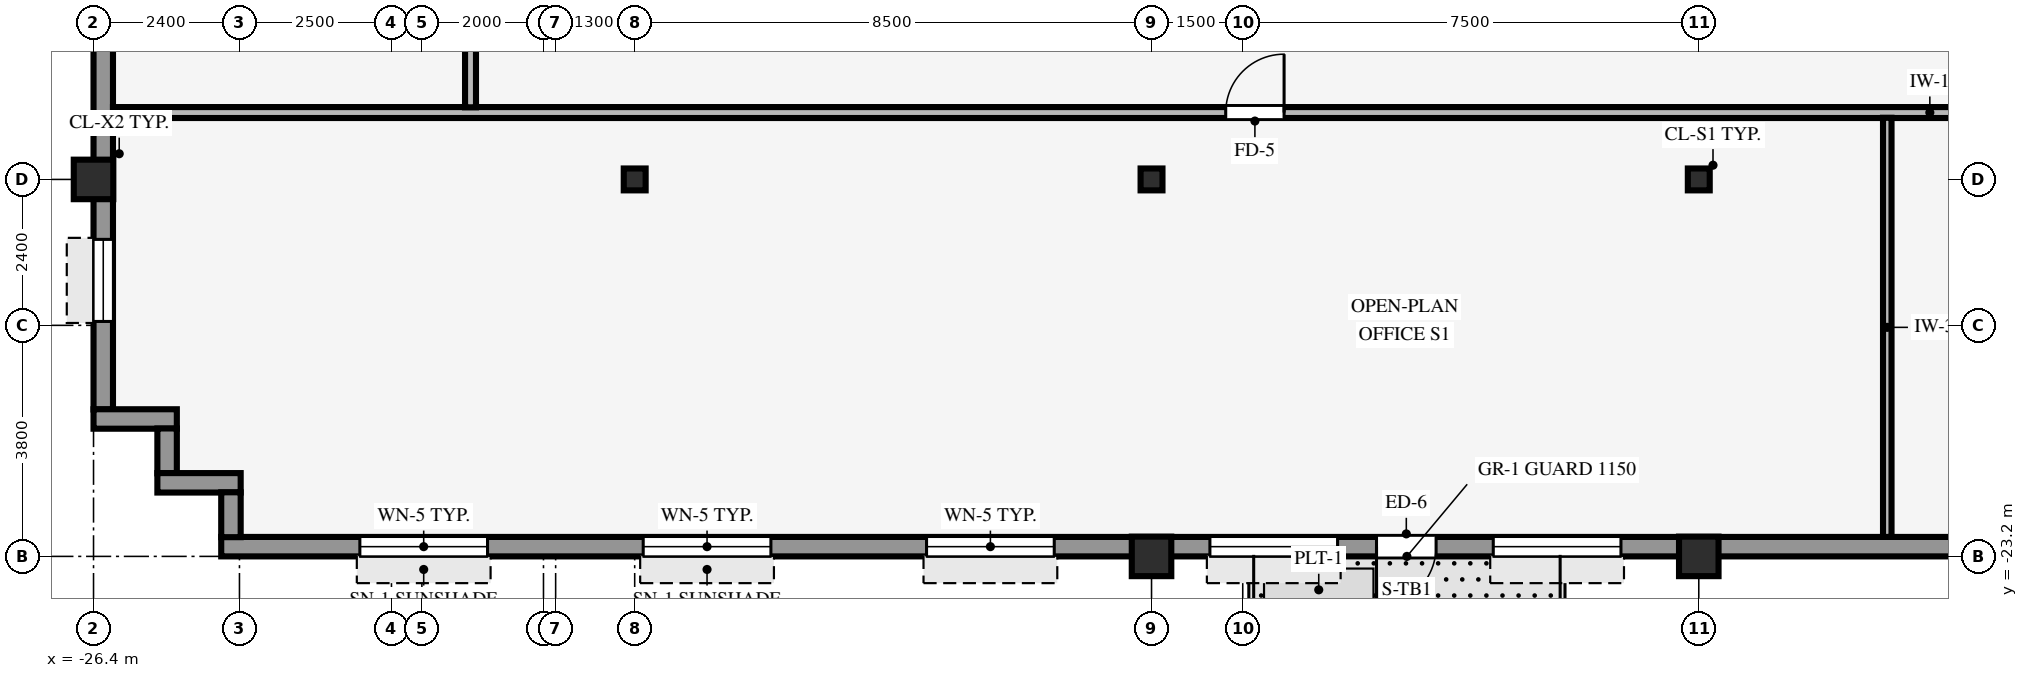
"""IFC4 building model, lengths in metres.
Left out: names, types, materials, properties, quantities, classifications, styles, units other than length and angle.
Written with IfcOpenShell. Run it as: python <this file> out.ifc"""

import sys

from ifc_helpers import new_model, si_unit, direction, frame, frame_2d, origin, origin_2d, place, context, subcontext, project, spatial, rectangle, hollow_rectangle, i_section, extrude, source, transform, mapped, element, fill, save


model = new_model("IFC4")
c1 = context("Model", 3, precision=1e-05, world=origin(), true_north=direction((0.0, 1.0)))
c2 = subcontext(c1, "Body", "Model", "MODEL_VIEW")
j1 = project(units=[si_unit("LENGTHUNIT", "METRE"), si_unit("PLANEANGLEUNIT", "RADIAN")], contexts=[c1])
p1 = place(None, origin())
s1 = spatial("IfcSite", under=j1, at=p1, CompositionType="ELEMENT")
p2 = place(p1, origin())
s2 = spatial("IfcBuilding", under=s1, at=p2, CompositionType="ELEMENT")
p3 = place(p2, frame((0.0, 0.0, 138.45)))
s3 = spatial("IfcBuildingStorey", under=s2, at=p3, CompositionType="ELEMENT", Elevation=138.45)
for number, where, z_axis, x_axis in (
    (1, (-26.4, -17.0, 0.0), (0.0, 0.0, 1.0), (1.0, 0.0, 0.0)),
    (2, (-9.0, -23.2, 0.0), (0.0, 0.0, 1.0), (1.0, 0.0, 0.0)),
    (3, (0.0, -23.2, 0.0), (0.0, 0.0, 1.0), (1.0, 0.0, 0.0)),
):
    element("IfcColumn", number, at=place(p3, frame(where, z_axis=z_axis, x_axis=x_axis)), inside=s3, PredefinedType="COLUMN", context=c2, shape_type="SweptSolid", body=[
        extrude(hollow_rectangle(XDim=0.65, YDim=0.65, WallThickness=0.04, InnerFilletRadius=0.04, OuterFilletRadius=0.08, at=origin_2d()), origin(), (0.0, 0.0, 1.0), 3.37),
    ])
for number, where, z_axis, x_axis in (
    (4, (0.0, -17.0, 0.0), (0.0, 0.0, 1.0), (1.0, 0.0, 0.0)),
    (5, (-17.5, -17.0, 0.0), (0.0, 0.0, 1.0), (1.0, 0.0, 0.0)),
    (6, (-9.0, -17.0, 0.0), (0.0, 0.0, 1.0), (1.0, 0.0, 0.0)),
):
    element("IfcColumn", number, at=place(p3, frame(where, z_axis=z_axis, x_axis=x_axis)), inside=s3, PredefinedType="COLUMN", context=c2, shape_type="SweptSolid", body=[
        extrude(i_section(OverallWidth=0.36, OverallDepth=0.36, WebThickness=0.021, FlangeThickness=0.021, FilletRadius=0.018, at=origin_2d()), origin(), (0.0, 0.0, 1.0), 3.37),
    ])
p4 = place(p3, frame((-24.3, -23.04, 0.0), z_axis=(0.0, 0.0, 1.0), x_axis=(1.0, 0.0, 0.0)))
e7 = element("IfcWall", 7, at=p4, inside=s3, PredefinedType="STANDARD", context=c2, shape_type="SweptSolid", body=[
    extrude(rectangle(XDim=48.6, YDim=0.32, at=frame_2d((24.3, 0.0))), origin(), (0.0, 0.0, 1.0), 2.705),
])
p5 = place(p4, frame((19.98, 0.0, 0.0), z_axis=(0.0, 0.0, 1.0), x_axis=(-1.0, 0.0, 0.0)))
e8 = element("IfcOpeningElement", 8, at=p5, cuts=e7, PredefinedType="OPENING", context=c2, shape_type="SweptSolid", body=[
    extrude(rectangle(XDim=0.98, YDim=2.15, at=frame_2d((0.49, 1.075))), frame((0.0, 0.17, 0.0), z_axis=(0.0, -1.0, 0.0), x_axis=(1.0, 0.0, 0.0)), (0.0, 0.0, 1.0), 0.34),
])
p6 = place(p4, frame((2.28, 0.0, 0.8)))
e9 = element("IfcOpeningElement", 9, at=p6, cuts=e7, PredefinedType="OPENING", context=c2, shape_type="SweptSolid", body=[
    extrude(rectangle(XDim=2.1, YDim=1.56, at=frame_2d((1.05, 0.78))), frame((0.0, 0.17, 0.0), z_axis=(0.0, -1.0, 0.0), x_axis=(1.0, 0.0, 0.0)), (0.0, 0.0, 1.0), 0.34),
])
p7 = place(p4, frame((6.94, 0.0, 0.8)))
e10 = element("IfcOpeningElement", 10, at=p7, cuts=e7, PredefinedType="OPENING", context=c2, shape_type="SweptSolid", body=[
    extrude(rectangle(XDim=2.1, YDim=1.56, at=frame_2d((1.05, 0.78))), frame((0.0, 0.17, 0.0), z_axis=(0.0, -1.0, 0.0), x_axis=(1.0, 0.0, 0.0)), (0.0, 0.0, 1.0), 0.34),
])
p8 = place(p4, frame((11.6, 0.0, 0.8)))
e11 = element("IfcOpeningElement", 11, at=p8, cuts=e7, PredefinedType="OPENING", context=c2, shape_type="SweptSolid", body=[
    extrude(rectangle(XDim=2.1, YDim=1.56, at=frame_2d((1.05, 0.78))), frame((0.0, 0.17, 0.0), z_axis=(0.0, -1.0, 0.0), x_axis=(1.0, 0.0, 0.0)), (0.0, 0.0, 1.0), 0.34),
])
p9 = place(p4, frame((16.26, 0.0, 0.8)))
e12 = element("IfcOpeningElement", 12, at=p9, cuts=e7, PredefinedType="OPENING", context=c2, shape_type="SweptSolid", body=[
    extrude(rectangle(XDim=2.1, YDim=1.56, at=frame_2d((1.05, 0.78))), frame((0.0, 0.17, 0.0), z_axis=(0.0, -1.0, 0.0), x_axis=(1.0, 0.0, 0.0)), (0.0, 0.0, 1.0), 0.34),
])
p10 = place(p4, frame((20.92, 0.0, 0.8)))
e13 = element("IfcOpeningElement", 13, at=p10, cuts=e7, PredefinedType="OPENING", context=c2, shape_type="SweptSolid", body=[
    extrude(rectangle(XDim=2.1, YDim=1.56, at=frame_2d((1.05, 0.78))), frame((0.0, 0.17, 0.0), z_axis=(0.0, -1.0, 0.0), x_axis=(1.0, 0.0, 0.0)), (0.0, 0.0, 1.0), 0.34),
])
p11 = place(p4, frame((30.24, 0.0, 0.8)))
e14 = element("IfcOpeningElement", 14, at=p11, cuts=e7, PredefinedType="OPENING", context=c2, shape_type="SweptSolid", body=[
    extrude(rectangle(XDim=2.1, YDim=1.56, at=frame_2d((1.05, 0.78))), frame((0.0, 0.17, 0.0), z_axis=(0.0, -1.0, 0.0), x_axis=(1.0, 0.0, 0.0)), (0.0, 0.0, 1.0), 0.34),
])
p12 = place(p4, frame((34.9, 0.0, 0.8)))
e15 = element("IfcOpeningElement", 15, at=p12, cuts=e7, PredefinedType="OPENING", context=c2, shape_type="SweptSolid", body=[
    extrude(rectangle(XDim=2.1, YDim=1.56, at=frame_2d((1.05, 0.78))), frame((0.0, 0.17, 0.0), z_axis=(0.0, -1.0, 0.0), x_axis=(1.0, 0.0, 0.0)), (0.0, 0.0, 1.0), 0.34),
])
p13 = place(p4, frame((39.56, 0.0, 0.8)))
e16 = element("IfcOpeningElement", 16, at=p13, cuts=e7, PredefinedType="OPENING", context=c2, shape_type="SweptSolid", body=[
    extrude(rectangle(XDim=2.1, YDim=1.56, at=frame_2d((1.05, 0.78))), frame((0.0, 0.17, 0.0), z_axis=(0.0, -1.0, 0.0), x_axis=(1.0, 0.0, 0.0)), (0.0, 0.0, 1.0), 0.34),
])
p14 = place(p4, frame((44.22, 0.0, 0.8)))
e17 = element("IfcOpeningElement", 17, at=p14, cuts=e7, PredefinedType="OPENING", context=c2, shape_type="SweptSolid", body=[
    extrude(rectangle(XDim=2.1, YDim=1.56, at=frame_2d((1.05, 0.78))), frame((0.0, 0.17, 0.0), z_axis=(0.0, -1.0, 0.0), x_axis=(1.0, 0.0, 0.0)), (0.0, 0.0, 1.0), 0.34),
])
p15 = place(p3, frame((-26.24, -20.784, 0.0), z_axis=(0.0, 0.0, 1.0), x_axis=(0.0, 1.0, 0.0)))
e18 = element("IfcWall", 18, at=p15, inside=s3, PredefinedType="STANDARD", context=c2, shape_type="SweptSolid", body=[
    extrude(rectangle(XDim=41.568, YDim=0.32, at=frame_2d((20.784, 0.0))), origin(), (0.0, 0.0, 1.0), 2.705),
])
p16 = place(p15, frame((1.448, 0.0, 0.8)))
e19 = element("IfcOpeningElement", 19, at=p16, cuts=e18, PredefinedType="OPENING", context=c2, shape_type="SweptSolid", body=[
    extrude(rectangle(XDim=1.35, YDim=1.56, at=frame_2d((0.675, 0.78))), frame((0.0, 0.17, 0.0), z_axis=(0.0, -1.0, 0.0), x_axis=(1.0, 0.0, 0.0)), (0.0, 0.0, 1.0), 0.34),
])
p17 = place(p15, frame((7.744, 0.0, 0.8)))
e20 = element("IfcOpeningElement", 20, at=p17, cuts=e18, PredefinedType="OPENING", context=c2, shape_type="SweptSolid", body=[
    extrude(rectangle(XDim=1.35, YDim=1.56, at=frame_2d((0.675, 0.78))), frame((0.0, 0.17, 0.0), z_axis=(0.0, -1.0, 0.0), x_axis=(1.0, 0.0, 0.0)), (0.0, 0.0, 1.0), 0.34),
])
p18 = place(p15, frame((12.69, 0.0, 0.8)))
e21 = element("IfcOpeningElement", 21, at=p18, cuts=e18, PredefinedType="OPENING", context=c2, shape_type="SweptSolid", body=[
    extrude(rectangle(XDim=1.35, YDim=1.56, at=frame_2d((0.675, 0.78))), frame((0.0, 0.17, 0.0), z_axis=(0.0, -1.0, 0.0), x_axis=(1.0, 0.0, 0.0)), (0.0, 0.0, 1.0), 0.34),
])
p19 = place(p15, frame((17.636, 0.0, 0.8)))
e22 = element("IfcOpeningElement", 22, at=p19, cuts=e18, PredefinedType="OPENING", context=c2, shape_type="SweptSolid", body=[
    extrude(rectangle(XDim=1.35, YDim=1.56, at=frame_2d((0.675, 0.78))), frame((0.0, 0.17, 0.0), z_axis=(0.0, -1.0, 0.0), x_axis=(1.0, 0.0, 0.0)), (0.0, 0.0, 1.0), 0.34),
])
p20 = place(p15, frame((22.582, 0.0, 0.8)))
e23 = element("IfcOpeningElement", 23, at=p20, cuts=e18, PredefinedType="OPENING", context=c2, shape_type="SweptSolid", body=[
    extrude(rectangle(XDim=1.35, YDim=1.56, at=frame_2d((0.675, 0.78))), frame((0.0, 0.17, 0.0), z_axis=(0.0, -1.0, 0.0), x_axis=(1.0, 0.0, 0.0)), (0.0, 0.0, 1.0), 0.34),
])
p21 = place(p15, frame((27.528, 0.0, 0.8)))
e24 = element("IfcOpeningElement", 24, at=p21, cuts=e18, PredefinedType="OPENING", context=c2, shape_type="SweptSolid", body=[
    extrude(rectangle(XDim=1.35, YDim=1.56, at=frame_2d((0.675, 0.78))), frame((0.0, 0.17, 0.0), z_axis=(0.0, -1.0, 0.0), x_axis=(1.0, 0.0, 0.0)), (0.0, 0.0, 1.0), 0.34),
])
p22 = place(p15, frame((32.474, 0.0, 0.8)))
e25 = element("IfcOpeningElement", 25, at=p22, cuts=e18, PredefinedType="OPENING", context=c2, shape_type="SweptSolid", body=[
    extrude(rectangle(XDim=1.35, YDim=1.56, at=frame_2d((0.675, 0.78))), frame((0.0, 0.17, 0.0), z_axis=(0.0, -1.0, 0.0), x_axis=(1.0, 0.0, 0.0)), (0.0, 0.0, 1.0), 0.34),
])
p23 = place(p15, frame((38.77, 0.0, 0.8)))
e26 = element("IfcOpeningElement", 26, at=p23, cuts=e18, PredefinedType="OPENING", context=c2, shape_type="SweptSolid", body=[
    extrude(rectangle(XDim=1.35, YDim=1.56, at=frame_2d((0.675, 0.78))), frame((0.0, 0.17, 0.0), z_axis=(0.0, -1.0, 0.0), x_axis=(1.0, 0.0, 0.0)), (0.0, 0.0, 1.0), 0.34),
])
p24 = place(p3, frame((-26.4, -20.94, 0.0), z_axis=(0.0, 0.0, 1.0), x_axis=(1.0, 0.0, 0.0)))
e27 = element("IfcWall", 27, at=p24, inside=s3, PredefinedType="STANDARD", context=c2, shape_type="SweptSolid", body=[
    extrude(rectangle(XDim=1.37, YDim=0.32, at=frame_2d((0.685, 0.0))), origin(), (0.0, 0.0, 1.0), 3.36),
])
p25 = place(p3, frame((-25.19, -21.834, 0.0), z_axis=(0.0, 0.0, 1.0), x_axis=(0.0, 1.0, 0.0)))
e28 = element("IfcWall", 28, at=p25, inside=s3, PredefinedType="STANDARD", context=c2, shape_type="SweptSolid", body=[
    extrude(rectangle(XDim=0.738, YDim=0.32, at=frame_2d((0.369, 0.0))), origin(), (0.0, 0.0, 1.0), 3.36),
])
p26 = place(p3, frame((-25.35, -21.99, 0.0), z_axis=(0.0, 0.0, 1.0), x_axis=(1.0, 0.0, 0.0)))
e29 = element("IfcWall", 29, at=p26, inside=s3, PredefinedType="STANDARD", context=c2, shape_type="SweptSolid", body=[
    extrude(rectangle(XDim=1.37, YDim=0.32, at=frame_2d((0.685, 0.0))), origin(), (0.0, 0.0, 1.0), 3.36),
])
p27 = place(p3, frame((-24.14, -22.884, 0.0), z_axis=(0.0, 0.0, 1.0), x_axis=(0.0, 1.0, 0.0)))
e30 = element("IfcWall", 30, at=p27, inside=s3, PredefinedType="STANDARD", context=c2, shape_type="SweptSolid", body=[
    extrude(rectangle(XDim=0.738, YDim=0.32, at=frame_2d((0.369, 0.0))), origin(), (0.0, 0.0, 1.0), 3.36),
])
p28 = place(p3, frame((-26.08, -15.9, 0.0), z_axis=(0.0, 0.0, 1.0), x_axis=(1.0, 0.0, 0.0)))
e31 = element("IfcWall", 31, at=p28, inside=s3, PredefinedType="PARTITIONING", context=c2, shape_type="SweptSolid", body=[
    extrude(rectangle(XDim=52.16, YDim=0.18, at=frame_2d((26.08, 0.0))), origin(), (0.0, 0.0, 1.0), 3.36),
])
p29 = place(p28, frame((18.3, 0.0, 0.0)))
e32 = element("IfcOpeningElement", 32, at=p29, cuts=e31, PredefinedType="OPENING", context=c2, shape_type="SweptSolid", body=[
    extrude(rectangle(XDim=0.96, YDim=2.1, at=frame_2d((0.48, 1.05))), frame((0.0, 0.1, 0.0), z_axis=(0.0, -1.0, 0.0), x_axis=(1.0, 0.0, 0.0)), (0.0, 0.0, 1.0), 0.2),
])
p30 = place(p28, frame((40.5, 0.0, 0.0)))
e33 = element("IfcOpeningElement", 33, at=p30, cuts=e31, PredefinedType="OPENING", context=c2, shape_type="SweptSolid", body=[
    extrude(rectangle(XDim=0.96, YDim=2.1, at=frame_2d((0.48, 1.05))), frame((0.0, 0.1, 0.0), z_axis=(0.0, -1.0, 0.0), x_axis=(1.0, 0.0, 0.0)), (0.0, 0.0, 1.0), 0.2),
])
p31 = place(p3, frame((-20.2, -15.814, 0.0), z_axis=(0.0, 0.0, 1.0), x_axis=(0.0, 1.0, 0.0)))
e34 = element("IfcWall", 34, at=p31, inside=s3, PredefinedType="PARTITIONING", context=c2, shape_type="SweptSolid", body=[
    extrude(rectangle(XDim=31.628, YDim=0.18, at=frame_2d((15.814, 0.0))), origin(), (0.0, 0.0, 1.0), 3.36),
])
p32 = place(p31, frame((10.684, 0.0, 0.0)))
e35 = element("IfcOpeningElement", 35, at=p32, cuts=e34, PredefinedType="OPENING", context=c2, shape_type="SweptSolid", body=[
    extrude(rectangle(XDim=0.96, YDim=2.1, at=frame_2d((0.48, 1.05))), frame((0.0, 0.1, 0.0), z_axis=(0.0, -1.0, 0.0), x_axis=(1.0, 0.0, 0.0)), (0.0, 0.0, 1.0), 0.2),
])
p33 = place(p31, frame((24.184, 0.0, 0.0)))
e36 = element("IfcOpeningElement", 36, at=p33, cuts=e34, PredefinedType="OPENING", context=c2, shape_type="SweptSolid", body=[
    extrude(rectangle(XDim=0.96, YDim=2.1, at=frame_2d((0.48, 1.05))), frame((0.0, 0.1, 0.0), z_axis=(0.0, -1.0, 0.0), x_axis=(1.0, 0.0, 0.0)), (0.0, 0.0, 1.0), 0.2),
])
p34 = place(p3, frame((3.1, -22.88, 0.0), z_axis=(0.0, 0.0, 1.0), x_axis=(0.0, 1.0, 0.0)))
e37 = element("IfcWall", 37, at=p34, inside=s3, PredefinedType="PARTITIONING", context=c2, shape_type="SweptSolid", body=[
    extrude(rectangle(XDim=6.894, YDim=0.14, at=frame_2d((3.447, 0.0))), origin(), (0.0, 0.0, 1.0), 3.36),
])
m1 = source(origin(), c2, "Body", "SweptSolid", [
    extrude(rectangle(XDim=0.98, YDim=2.15, at=frame_2d((0.49, 1.075))), frame((0.0, 0.025, 0.0), z_axis=(0.0, -1.0, 0.0), x_axis=(1.0, 0.0, 0.0)), (0.0, 0.0, 1.0), 0.05),
])
p35 = place(p5, origin())
e38 = element("IfcDoor", 38, at=p35, inside=s3, OperationType="SINGLE_SWING_RIGHT", PredefinedType="DOOR", context=c2, shape_type="MappedRepresentation", body=[
    mapped(m1, transform((0.0, 0.0, 0.0), scale=1.0)),
])
fill(e8, e38)
m2 = source(origin(), c2, "Body", "SweptSolid", [
    extrude(rectangle(XDim=2.1, YDim=1.56, at=frame_2d((1.05, 0.78))), frame((0.0, 0.03, 0.0), z_axis=(0.0, -1.0, 0.0), x_axis=(1.0, 0.0, 0.0)), (0.0, 0.0, 1.0), 0.06),
])
p36 = place(p6, origin())
e39 = element("IfcWindow", 39, at=p36, inside=s3, PartitioningType="SINGLE_PANEL", PredefinedType="WINDOW", context=c2, shape_type="MappedRepresentation", body=[
    mapped(m2, transform((0.0, 0.0, 0.0), scale=1.0)),
])
fill(e9, e39)
p37 = place(p7, origin())
e40 = element("IfcWindow", 40, at=p37, inside=s3, PartitioningType="SINGLE_PANEL", PredefinedType="WINDOW", context=c2, shape_type="MappedRepresentation", body=[
    mapped(m2, transform((0.0, 0.0, 0.0), scale=1.0)),
])
fill(e10, e40)
p38 = place(p8, origin())
e41 = element("IfcWindow", 41, at=p38, inside=s3, PartitioningType="SINGLE_PANEL", PredefinedType="WINDOW", context=c2, shape_type="MappedRepresentation", body=[
    mapped(m2, transform((0.0, 0.0, 0.0), scale=1.0)),
])
fill(e11, e41)
p39 = place(p9, origin())
e42 = element("IfcWindow", 42, at=p39, inside=s3, PartitioningType="SINGLE_PANEL", PredefinedType="WINDOW", context=c2, shape_type="MappedRepresentation", body=[
    mapped(m2, transform((0.0, 0.0, 0.0), scale=1.0)),
])
fill(e12, e42)
p40 = place(p10, origin())
e43 = element("IfcWindow", 43, at=p40, inside=s3, PartitioningType="SINGLE_PANEL", PredefinedType="WINDOW", context=c2, shape_type="MappedRepresentation", body=[
    mapped(m2, transform((0.0, 0.0, 0.0), scale=1.0)),
])
fill(e13, e43)
m3 = source(origin(), c2, "Body", "SweptSolid", [
    extrude(rectangle(XDim=1.35, YDim=1.56, at=frame_2d((0.675, 0.78))), frame((0.0, 0.03, 0.0), z_axis=(0.0, -1.0, 0.0), x_axis=(1.0, 0.0, 0.0)), (0.0, 0.0, 1.0), 0.06),
])
p41 = place(p16, origin())
e44 = element("IfcWindow", 44, at=p41, inside=s3, PartitioningType="SINGLE_PANEL", PredefinedType="WINDOW", context=c2, shape_type="MappedRepresentation", body=[
    mapped(m3, transform((0.0, 0.0, 0.0), scale=1.0)),
])
fill(e19, e44)
m4 = source(origin(), c2, "Body", "SweptSolid", [
    extrude(rectangle(XDim=0.96, YDim=2.1, at=frame_2d((0.48, 1.05))), frame((0.0, 0.025, 0.0), z_axis=(0.0, -1.0, 0.0), x_axis=(1.0, 0.0, 0.0)), (0.0, 0.0, 1.0), 0.05),
])
p42 = place(p29, origin())
e45 = element("IfcDoor", 45, at=p42, inside=s3, OperationType="SINGLE_SWING_RIGHT", PredefinedType="DOOR", context=c2, shape_type="MappedRepresentation", body=[
    mapped(m4, transform((0.0, 0.0, 0.0), scale=1.0)),
])
fill(e32, e45)
save(model, sys.argv[1])
